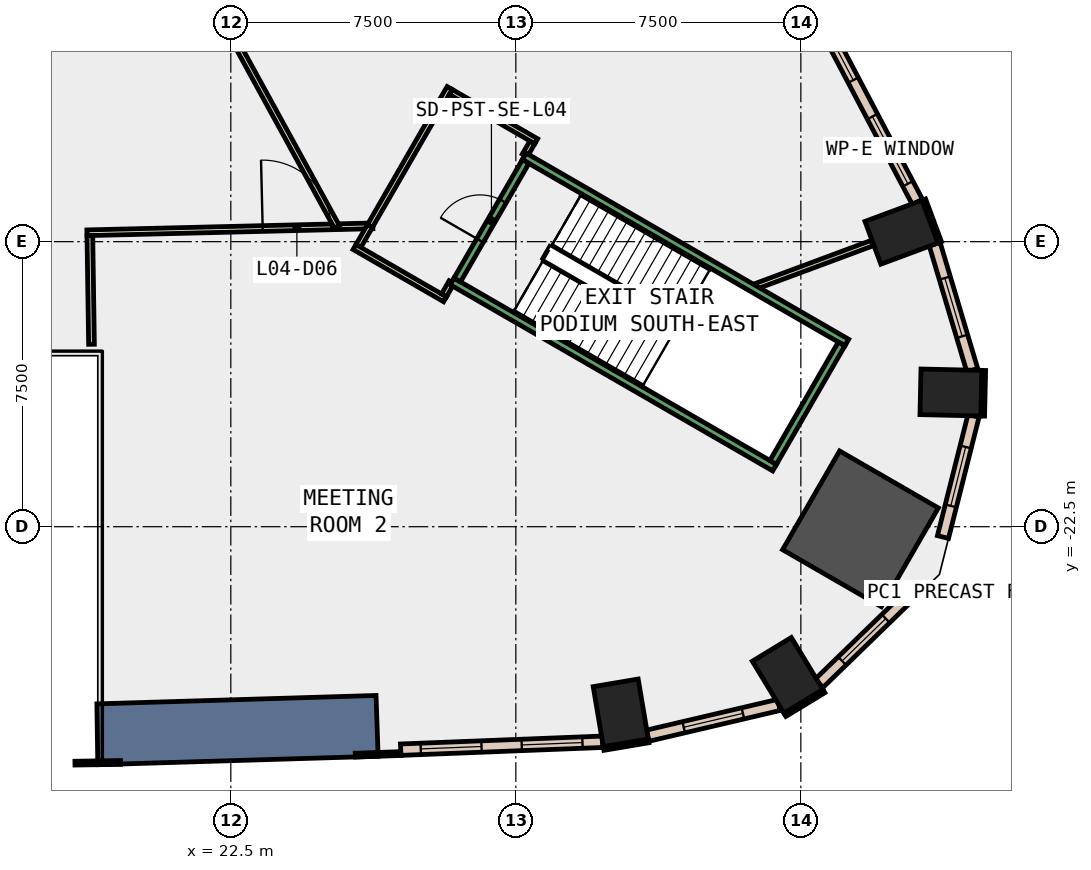
"""IFC4 building model, lengths in metres.
Left out: names, types, materials, properties, quantities, classifications, styles, units other than length and angle.
Written with IfcOpenShell. Run it as: python <this file> out.ifc"""

import sys

from ifc_helpers import new_model, si_unit, direction, frame, frame_2d, origin, origin_2d, place, context, subcontext, project, spatial, polyline, rectangle, outline, extrude, element, fill, save


model = new_model("IFC4")
c1 = context("Model", 3, precision=1e-05, world=origin(), true_north=direction((0.0, 1.0)))
c2 = subcontext(c1, "Body", "Model", "MODEL_VIEW")
j1 = project(units=[si_unit("LENGTHUNIT", "METRE"), si_unit("PLANEANGLEUNIT", "RADIAN")], contexts=[c1])
p1 = place(None, origin())
s1 = spatial("IfcSite", under=j1, at=p1, CompositionType="ELEMENT")
p2 = place(p1, origin())
s2 = spatial("IfcBuilding", under=s1, at=p2, CompositionType="ELEMENT")
p3 = place(p2, frame((0.0, 0.0, 25.0)))
s3 = spatial("IfcBuildingStorey", under=s2, at=p3, CompositionType="ELEMENT", Elevation=25.0)
for number, where, z_axis, x_axis in (
    (1, (32.761, -27.397, -0.45), (0.0, 0.0, 1.0), (0.986, 0.167, 0.0)),
    (2, (37.152, -26.411, -0.45), (0.0, 0.0, 1.0), (0.855, 0.519, 0.0)),
):
    element("IfcColumn", number, at=place(p3, frame(where, z_axis=z_axis, x_axis=x_axis)), inside=s3, PredefinedType="COLUMN", context=c2, shape_type="SweptSolid", body=[
        extrude(rectangle(XDim=1.2, YDim=1.6, at=origin_2d()), origin(), (0.0, 0.0, 1.0), 5.0),
    ])
p4 = place(p3, frame((39.069, -22.556, -0.45), z_axis=(0.0, 0.0, 1.0), x_axis=(-0.866025403784, 0.5, 0.0)))
e3 = element("IfcColumn", 3, at=p4, inside=s3, PredefinedType="COLUMN", context=c2, shape_type="SweptSolid", body=[
    extrude(rectangle(XDim=3.0, YDim=3.0, at=origin_2d()), origin(), (0.0, 0.0, 1.0), 5.0),
])
for number, where, z_axis, x_axis in (
    (4, (41.448, -18.969, -0.45), (0.0, 0.0, 1.0), (0.023, 1.0, 0.0)),
    (5, (40.147, -14.751, -0.45), (0.0, 0.0, 1.0), (-0.348, 0.937, 0.0)),
):
    element("IfcColumn", number, at=place(p3, frame(where, z_axis=z_axis, x_axis=x_axis)), inside=s3, PredefinedType="COLUMN", context=c2, shape_type="SweptSolid", body=[
        extrude(rectangle(XDim=1.2, YDim=1.6, at=origin_2d()), origin(), (0.0, 0.0, 1.0), 5.0),
    ])
p5 = place(p3, frame((0.0, 0.0, -0.45)))
e6 = element("IfcWall", 6, at=p5, inside=s3, PredefinedType="SHEAR", context=c2, shape_type="SweptSolid", body=[
    extrude(outline(polyline([(19.0, -28.762), (26.377, -28.54), (26.321, -26.941), (18.976, -27.162), (19.0, -28.762)])), origin(), (0.0, 0.0, 1.0), 5.0),
])
p6 = place(p3, frame((41.153, -15.018, 0.0), z_axis=(0.0, 0.0, 1.0), x_axis=(-0.348268249601, 0.937394914814, 0.0)))
e7 = element("IfcWall", 7, at=p6, inside=s3, PredefinedType="STANDARD", context=c2, shape_type="SweptSolid", body=[
    extrude(rectangle(XDim=1.2, YDim=0.1, at=frame_2d((0.6, 0.0))), origin(), (0.0, 0.0, 1.0), 4.55),
])
p7 = place(p3, frame((18.399, -28.721, 0.0), z_axis=(0.0, 0.0, 1.0), x_axis=(0.999886724523, 0.015051183404, 0.0)))
e8 = element("IfcWall", 8, at=p7, inside=s3, PredefinedType="STANDARD", context=c2, shape_type="SweptSolid", body=[
    extrude(rectangle(XDim=1.2, YDim=0.1, at=frame_2d((0.6, 0.0))), origin(), (0.0, 0.0, 1.0), 4.55),
])
p8 = place(p3, frame((25.776, -28.511, 0.0), z_axis=(0.0, 0.0, 1.0), x_axis=(0.999387493042, 0.034994838926, 0.0)))
e9 = element("IfcWall", 9, at=p8, inside=s3, PredefinedType="STANDARD", context=c2, shape_type="SweptSolid", body=[
    extrude(rectangle(XDim=1.2, YDim=0.1, at=frame_2d((0.6, 0.0))), origin(), (0.0, 0.0, 1.0), 4.55),
])
p9 = place(p3, frame((32.311, -28.335, 0.0), z_axis=(0.0, 0.0, 1.0), x_axis=(0.986011774526, 0.166675674579, 0.0)))
e10 = element("IfcWall", 10, at=p9, inside=s3, PredefinedType="STANDARD", context=c2, shape_type="SweptSolid", body=[
    extrude(rectangle(XDim=1.2, YDim=0.1, at=frame_2d((0.6, 0.0))), origin(), (0.0, 0.0, 1.0), 4.55),
])
for number, where, z_axis, x_axis in (
    (11, (37.08, -27.449, 0.0), (0.0, 0.0, 1.0), (0.855, 0.519, 0.0)),
    (12, (42.284, -19.588, 0.0), (0.0, 0.0, 1.0), (0.023, 1.0, 0.0)),
):
    element("IfcWall", number, at=place(p3, frame(where, z_axis=z_axis, x_axis=x_axis)), inside=s3, PredefinedType="STANDARD", context=c2, shape_type="SweptSolid", body=[
        extrude(rectangle(XDim=1.2, YDim=0.1, at=frame_2d((0.6, 0.0))), origin(), (0.0, 0.0, 1.0), 4.55),
    ])
p10 = place(p3, frame((26.97, -28.367, 0.0), z_axis=(0.0, 0.0, 1.0), x_axis=(0.999234205654, 0.039128023863, 0.0)))
e13 = element("IfcWall", 13, at=p10, inside=s3, PredefinedType="STANDARD", context=c2, shape_type="SweptSolid", body=[
    extrude(rectangle(XDim=5.316, YDim=0.3, at=frame_2d((2.658, 0.0))), origin(), (0.0, 0.0, 1.0), 4.55),
])
p11 = place(p10, frame((0.529, 0.0, 1.0)))
e14 = element("IfcOpeningElement", 14, at=p11, cuts=e13, PredefinedType="OPENING", context=c2, shape_type="SweptSolid", body=[
    extrude(rectangle(XDim=1.6, YDim=3.2, at=frame_2d((0.8, 1.6))), frame((0.0, 0.16, 0.0), z_axis=(0.0, -1.0, 0.0), x_axis=(1.0, 0.0, 0.0)), (0.0, 0.0, 1.0), 0.32),
])
p12 = place(p10, frame((3.187, 0.0, 1.0)))
e15 = element("IfcOpeningElement", 15, at=p12, cuts=e13, PredefinedType="OPENING", context=c2, shape_type="SweptSolid", body=[
    extrude(rectangle(XDim=1.6, YDim=3.2, at=frame_2d((0.8, 1.6))), frame((0.0, 0.16, 0.0), z_axis=(0.0, -1.0, 0.0), x_axis=(1.0, 0.0, 0.0)), (0.0, 0.0, 1.0), 0.32),
])
p13 = place(p3, frame((33.47, -27.999, 0.0), z_axis=(0.0, 0.0, 1.0), x_axis=(0.97357041301, 0.228387063799, 0.0)))
e16 = element("IfcWall", 16, at=p13, inside=s3, PredefinedType="STANDARD", context=c2, shape_type="SweptSolid", body=[
    extrude(rectangle(XDim=3.547, YDim=0.3, at=frame_2d((1.773, 0.0))), origin(), (0.0, 0.0, 1.0), 4.55),
])
p14 = place(p13, frame((0.973, 0.0, 1.0)))
e17 = element("IfcOpeningElement", 17, at=p14, cuts=e16, PredefinedType="OPENING", context=c2, shape_type="SweptSolid", body=[
    extrude(rectangle(XDim=1.6, YDim=3.2, at=frame_2d((0.8, 1.6))), frame((0.0, 0.16, 0.0), z_axis=(0.0, -1.0, 0.0), x_axis=(1.0, 0.0, 0.0)), (0.0, 0.0, 1.0), 0.32),
])
p15 = place(p3, frame((37.98, -26.621, 0.0), z_axis=(0.0, 0.0, 1.0), x_axis=(0.717527250225, 0.696530433782, 0.0)))
e18 = element("IfcWall", 18, at=p15, inside=s3, PredefinedType="STANDARD", context=c2, shape_type="SweptSolid", body=[
    extrude(rectangle(XDim=3.291, YDim=0.3, at=frame_2d((1.645, 0.0))), origin(), (0.0, 0.0, 1.0), 4.55),
])
p16 = place(p15, frame((0.845, 0.0, 1.0)))
e19 = element("IfcOpeningElement", 19, at=p16, cuts=e18, PredefinedType="OPENING", context=c2, shape_type="SweptSolid", body=[
    extrude(rectangle(XDim=1.6, YDim=3.2, at=frame_2d((0.8, 1.6))), frame((0.0, 0.16, 0.0), z_axis=(0.0, -1.0, 0.0), x_axis=(1.0, 0.0, 0.0)), (0.0, 0.0, 1.0), 0.32),
])
p17 = place(p3, frame((41.24, -22.772, 0.0), z_axis=(0.0, 0.0, 1.0), x_axis=(0.244315836028, 0.969695711172, 0.0)))
e20 = element("IfcWall", 20, at=p17, inside=s3, PredefinedType="STANDARD", context=c2, shape_type="SweptSolid", body=[
    extrude(rectangle(XDim=3.291, YDim=0.3, at=frame_2d((1.645, 0.0))), origin(), (0.0, 0.0, 1.0), 4.55),
])
p18 = place(p17, frame((0.845, 0.0, 1.0)))
e21 = element("IfcOpeningElement", 21, at=p18, cuts=e20, PredefinedType="OPENING", context=c2, shape_type="SweptSolid", body=[
    extrude(rectangle(XDim=1.6, YDim=3.2, at=frame_2d((0.8, 1.6))), frame((0.0, 0.16, 0.0), z_axis=(0.0, -1.0, 0.0), x_axis=(1.0, 0.0, 0.0)), (0.0, 0.0, 1.0), 0.32),
])
p19 = place(p3, frame((42.011, -18.382, 0.0), z_axis=(0.0, 0.0, 1.0), x_axis=(-0.285800575124, 0.958289116738, 0.0)))
e22 = element("IfcWall", 22, at=p19, inside=s3, PredefinedType="STANDARD", context=c2, shape_type="SweptSolid", body=[
    extrude(rectangle(XDim=3.46, YDim=0.3, at=frame_2d((1.73, 0.0))), origin(), (0.0, 0.0, 1.0), 4.55),
])
p20 = place(p19, frame((0.93, 0.0, 1.0)))
e23 = element("IfcOpeningElement", 23, at=p20, cuts=e22, PredefinedType="OPENING", context=c2, shape_type="SweptSolid", body=[
    extrude(rectangle(XDim=1.6, YDim=3.2, at=frame_2d((0.8, 1.6))), frame((0.0, 0.16, 0.0), z_axis=(0.0, -1.0, 0.0), x_axis=(1.0, 0.0, 0.0)), (0.0, 0.0, 1.0), 0.32),
])
p21 = place(p3, frame((40.568, -13.956, 0.0), z_axis=(0.0, 0.0, 1.0), x_axis=(-0.466125129602, 0.884718804792, 0.0)))
e24 = element("IfcWall", 24, at=p21, inside=s3, PredefinedType="STANDARD", context=c2, shape_type="SweptSolid", body=[
    extrude(rectangle(XDim=6.164, YDim=0.3, at=frame_2d((3.082, 0.0))), origin(), (0.0, 0.0, 1.0), 4.55),
])
p22 = place(p21, frame((0.541, 0.0, 1.0)))
e25 = element("IfcOpeningElement", 25, at=p22, cuts=e24, PredefinedType="OPENING", context=c2, shape_type="SweptSolid", body=[
    extrude(rectangle(XDim=2.0, YDim=3.2, at=frame_2d((1.0, 1.6))), frame((0.0, 0.16, 0.0), z_axis=(0.0, -1.0, 0.0), x_axis=(1.0, 0.0, 0.0)), (0.0, 0.0, 1.0), 0.32),
])
p23 = place(p21, frame((3.623, 0.0, 1.0)))
e26 = element("IfcOpeningElement", 26, at=p23, cuts=e24, PredefinedType="OPENING", context=c2, shape_type="SweptSolid", body=[
    extrude(rectangle(XDim=2.0, YDim=3.2, at=frame_2d((1.0, 1.6))), frame((0.0, 0.16, 0.0), z_axis=(0.0, -1.0, 0.0), x_axis=(1.0, 0.0, 0.0)), (0.0, 0.0, 1.0), 0.32),
])
p24 = place(p3, frame((36.334, -16.168, 0.0), z_axis=(0.0, 0.0, 1.0), x_axis=(0.937400028274, 0.348254485961, 0.0)))
e27 = element("IfcWall", 27, at=p24, inside=s3, PredefinedType="PARTITIONING", context=c2, shape_type="SweptSolid", body=[
    extrude(rectangle(XDim=3.247, YDim=0.15, at=frame_2d((1.624, 0.0))), origin(), (0.0, 0.0, 1.0), 4.55),
])
p25 = place(p3, frame((18.715, -14.766, 0.0), z_axis=(0.0, 0.0, 1.0), x_axis=(0.999706996131, 0.024205823405, 0.0)))
e28 = element("IfcWall", 28, at=p25, inside=s3, PredefinedType="PARTITIONING", context=c2, shape_type="SweptSolid", body=[
    extrude(rectangle(XDim=7.524, YDim=0.15, at=frame_2d((3.762, 0.0))), origin(), (0.0, 0.0, 1.0), 4.55),
])
p26 = place(p25, frame((4.625, 0.0, 0.0)))
e29 = element("IfcOpeningElement", 29, at=p26, cuts=e28, PredefinedType="OPENING", context=c2, shape_type="SweptSolid", body=[
    extrude(rectangle(XDim=1.8, YDim=2.1, at=frame_2d((0.9, 1.05))), frame((0.0, 0.085, 0.0), z_axis=(0.0, -1.0, 0.0), x_axis=(1.0, 0.0, 0.0)), (0.0, 0.0, 1.0), 0.17),
])
p27 = place(p3, frame((26.162, -14.586, 0.0), z_axis=(0.0, 0.0, 1.0), x_axis=(-0.499849787464, -0.866112111665, 0.0)))
e30 = element("IfcWall", 30, at=p27, inside=s3, PredefinedType="PARTITIONING", context=c2, shape_type="SweptSolid", body=[
    extrude(rectangle(XDim=0.609, YDim=0.15, at=frame_2d((0.304, 0.0))), origin(), (0.0, 0.0, 1.0), 4.55),
])
p28 = place(p3, frame((25.755, -15.141, 0.0), z_axis=(0.0, 0.0, 1.0), x_axis=(0.866263914087, -0.499586660302, 0.0)))
e31 = element("IfcWall", 31, at=p28, inside=s3, PredefinedType="PARTITIONING", context=c2, shape_type="SweptSolid", body=[
    extrude(rectangle(XDim=2.75, YDim=0.15, at=frame_2d((1.375, 0.0))), origin(), (0.0, 0.0, 1.0), 4.55),
])
p29 = place(p3, frame((28.11, -16.413, 0.0), z_axis=(0.0, 0.0, 1.0), x_axis=(0.498310290291, 0.866998762739, 0.0)))
e32 = element("IfcWall", 32, at=p29, inside=s3, PredefinedType="PARTITIONING", context=c2, shape_type="SweptSolid", body=[
    extrude(rectangle(XDim=0.399, YDim=0.15, at=frame_2d((0.2, 0.0))), origin(), (0.0, 0.0, 1.0), 4.55),
])
p30 = place(p3, frame((18.834, -17.7, 0.0), z_axis=(0.0, 0.0, 1.0), x_axis=(-0.015017934076, 0.999887224469, 0.0)))
e33 = element("IfcWall", 33, at=p30, inside=s3, PredefinedType="PARTITIONING", context=c2, shape_type="SweptSolid", body=[
    extrude(rectangle(XDim=2.861, YDim=0.15, at=frame_2d((1.431, 0.0))), origin(), (0.0, 0.0, 1.0), 4.55),
])
p31 = place(p3, frame((25.289, -14.607, 0.0), z_axis=(0.0, 0.0, 1.0), x_axis=(-0.480597861754, 0.876941101373, 0.0)))
e34 = element("IfcWall", 34, at=p31, inside=s3, PredefinedType="PARTITIONING", context=c2, shape_type="SweptSolid", body=[
    extrude(rectangle(XDim=7.609, YDim=0.15, at=frame_2d((3.805, 0.0))), origin(), (0.0, 0.0, 1.0), 4.55),
])
p32 = place(p3, frame((30.235, -12.733, 0.0), z_axis=(0.0, 0.0, 1.0), x_axis=(0.499352927503, 0.866398669086, 0.0)))
e35 = element("IfcWall", 35, at=p32, inside=s3, PredefinedType="PARTITIONING", context=c2, shape_type="SweptSolid", body=[
    extrude(rectangle(XDim=0.4, YDim=0.15, at=frame_2d((0.2, 0.0))), origin(), (0.0, 0.0, 1.0), 4.55),
])
p33 = place(p3, frame((30.537, -12.358, 0.0), z_axis=(0.0, 0.0, 1.0), x_axis=(-0.866108986466, 0.499855202596, 0.0)))
e36 = element("IfcWall", 36, at=p33, inside=s3, PredefinedType="PARTITIONING", context=c2, shape_type="SweptSolid", body=[
    extrude(rectangle(XDim=2.6, YDim=0.15, at=frame_2d((1.3, 0.0))), origin(), (0.0, 0.0, 1.0), 4.55),
])
p34 = place(p3, frame((28.257, -10.956, 0.0), z_axis=(0.0, 0.0, 1.0), x_axis=(-0.49986701167, -0.866102171019, 0.0)))
e37 = element("IfcWall", 37, at=p34, inside=s3, PredefinedType="PARTITIONING", context=c2, shape_type="SweptSolid", body=[
    extrude(rectangle(XDim=4.191, YDim=0.15, at=frame_2d((2.096, 0.0))), origin(), (0.0, 0.0, 1.0), 4.55),
])
for number, where, z_axis, x_axis in (
    (38, (28.322, -16.045, 0.0), (0.0, 0.0, 1.0), (0.866, -0.5, 0.0)),
    (39, (30.222, -12.755, 0.0), (0.0, 0.0, 1.0), (0.866, -0.5, 0.0)),
):
    element("IfcWall", number, at=place(p3, frame(where, z_axis=z_axis, x_axis=x_axis)), inside=s3, PredefinedType="STANDARD", context=c2, shape_type="SweptSolid", body=[
        extrude(rectangle(XDim=9.8, YDim=0.2, at=frame_2d((4.9, 0.0))), origin(), (0.0, 0.0, 1.0), 4.55),
    ])
p35 = place(p3, frame((28.458, -16.009, 0.0), z_axis=(0.0, 0.0, 1.0), x_axis=(0.499982693035, 0.866035395735, 0.0)))
e40 = element("IfcWall", 40, at=p35, inside=s3, PredefinedType="STANDARD", context=c2, shape_type="SweptSolid", body=[
    extrude(rectangle(XDim=3.6, YDim=0.2, at=frame_2d((1.8, 0.0))), origin(), (0.0, 0.0, 1.0), 4.55),
])
p36 = place(p35, frame((1.2, 0.0, 0.0)))
e41 = element("IfcOpeningElement", 41, at=p36, cuts=e40, PredefinedType="OPENING", context=c2, shape_type="SweptSolid", body=[
    extrude(rectangle(XDim=1.2, YDim=2.2, at=frame_2d((0.6, 1.1))), frame((0.0, 0.11, 0.0), z_axis=(0.0, -1.0, 0.0), x_axis=(1.0, 0.0, 0.0)), (0.0, 0.0, 1.0), 0.22),
])
p37 = place(p3, frame((36.772, -20.809, 0.0), z_axis=(0.0, 0.0, 1.0), x_axis=(0.49995333141, 0.866052346231, 0.0)))
e42 = element("IfcWall", 42, at=p37, inside=s3, PredefinedType="STANDARD", context=c2, shape_type="SweptSolid", body=[
    extrude(rectangle(XDim=3.6, YDim=0.2, at=frame_2d((1.8, 0.0))), origin(), (0.0, 0.0, 1.0), 4.55),
])
p38 = place(p11, origin())
e43 = element("IfcWindow", 43, at=p38, inside=s3, PartitioningType="SINGLE_PANEL", PredefinedType="WINDOW", context=c2, shape_type="SweptSolid", body=[
    extrude(rectangle(XDim=1.6, YDim=3.2, at=frame_2d((0.8, 1.6))), frame((0.0, 0.03, 0.0), z_axis=(0.0, -1.0, 0.0), x_axis=(1.0, 0.0, 0.0)), (0.0, 0.0, 1.0), 0.06),
])
fill(e14, e43)
p39 = place(p12, origin())
e44 = element("IfcWindow", 44, at=p39, inside=s3, PartitioningType="SINGLE_PANEL", PredefinedType="WINDOW", context=c2, shape_type="SweptSolid", body=[
    extrude(rectangle(XDim=1.6, YDim=3.2, at=frame_2d((0.8, 1.6))), frame((0.0, 0.03, 0.0), z_axis=(0.0, -1.0, 0.0), x_axis=(1.0, 0.0, 0.0)), (0.0, 0.0, 1.0), 0.06),
])
fill(e15, e44)
p40 = place(p14, origin())
e45 = element("IfcWindow", 45, at=p40, inside=s3, PartitioningType="SINGLE_PANEL", PredefinedType="WINDOW", context=c2, shape_type="SweptSolid", body=[
    extrude(rectangle(XDim=1.6, YDim=3.2, at=frame_2d((0.8, 1.6))), frame((0.0, 0.03, 0.0), z_axis=(0.0, -1.0, 0.0), x_axis=(1.0, 0.0, 0.0)), (0.0, 0.0, 1.0), 0.06),
])
fill(e17, e45)
p41 = place(p16, origin())
e46 = element("IfcWindow", 46, at=p41, inside=s3, PartitioningType="SINGLE_PANEL", PredefinedType="WINDOW", context=c2, shape_type="SweptSolid", body=[
    extrude(rectangle(XDim=1.6, YDim=3.2, at=frame_2d((0.8, 1.6))), frame((0.0, 0.03, 0.0), z_axis=(0.0, -1.0, 0.0), x_axis=(1.0, 0.0, 0.0)), (0.0, 0.0, 1.0), 0.06),
])
fill(e19, e46)
p42 = place(p18, origin())
e47 = element("IfcWindow", 47, at=p42, inside=s3, PartitioningType="SINGLE_PANEL", PredefinedType="WINDOW", context=c2, shape_type="SweptSolid", body=[
    extrude(rectangle(XDim=1.6, YDim=3.2, at=frame_2d((0.8, 1.6))), frame((0.0, 0.03, 0.0), z_axis=(0.0, -1.0, 0.0), x_axis=(1.0, 0.0, 0.0)), (0.0, 0.0, 1.0), 0.06),
])
fill(e21, e47)
p43 = place(p20, origin())
e48 = element("IfcWindow", 48, at=p43, inside=s3, PartitioningType="SINGLE_PANEL", PredefinedType="WINDOW", context=c2, shape_type="SweptSolid", body=[
    extrude(rectangle(XDim=1.6, YDim=3.2, at=frame_2d((0.8, 1.6))), frame((0.0, 0.03, 0.0), z_axis=(0.0, -1.0, 0.0), x_axis=(1.0, 0.0, 0.0)), (0.0, 0.0, 1.0), 0.06),
])
fill(e23, e48)
p44 = place(p22, origin())
e49 = element("IfcWindow", 49, at=p44, inside=s3, PartitioningType="SINGLE_PANEL", PredefinedType="WINDOW", context=c2, shape_type="SweptSolid", body=[
    extrude(rectangle(XDim=2.0, YDim=3.2, at=frame_2d((1.0, 1.6))), frame((0.0, 0.03, 0.0), z_axis=(0.0, -1.0, 0.0), x_axis=(1.0, 0.0, 0.0)), (0.0, 0.0, 1.0), 0.06),
])
fill(e25, e49)
p45 = place(p23, origin())
e50 = element("IfcWindow", 50, at=p45, inside=s3, PartitioningType="SINGLE_PANEL", PredefinedType="WINDOW", context=c2, shape_type="SweptSolid", body=[
    extrude(rectangle(XDim=2.0, YDim=3.2, at=frame_2d((1.0, 1.6))), frame((0.0, 0.03, 0.0), z_axis=(0.0, -1.0, 0.0), x_axis=(1.0, 0.0, 0.0)), (0.0, 0.0, 1.0), 0.06),
])
fill(e26, e50)
p46 = place(p26, origin())
e51 = element("IfcDoor", 51, at=p46, inside=s3, OperationType="DOUBLE_DOOR_SINGLE_SWING", PredefinedType="DOOR", context=c2, shape_type="SweptSolid", body=[
    extrude(rectangle(XDim=1.8, YDim=2.1, at=frame_2d((0.9, 1.05))), frame((0.0, 0.025, 0.0), z_axis=(0.0, -1.0, 0.0), x_axis=(1.0, 0.0, 0.0)), (0.0, 0.0, 1.0), 0.05),
])
fill(e29, e51)
p47 = place(p36, origin())
e52 = element("IfcDoor", 52, at=p47, inside=s3, OperationType="SINGLE_SWING_LEFT", PredefinedType="DOOR", context=c2, shape_type="SweptSolid", body=[
    extrude(rectangle(XDim=1.2, YDim=2.2, at=frame_2d((0.6, 1.1))), frame((0.0, 0.025, 0.0), z_axis=(0.0, -1.0, 0.0), x_axis=(1.0, 0.0, 0.0)), (0.0, 0.0, 1.0), 0.05),
])
fill(e41, e52)
save(model, sys.argv[1])
